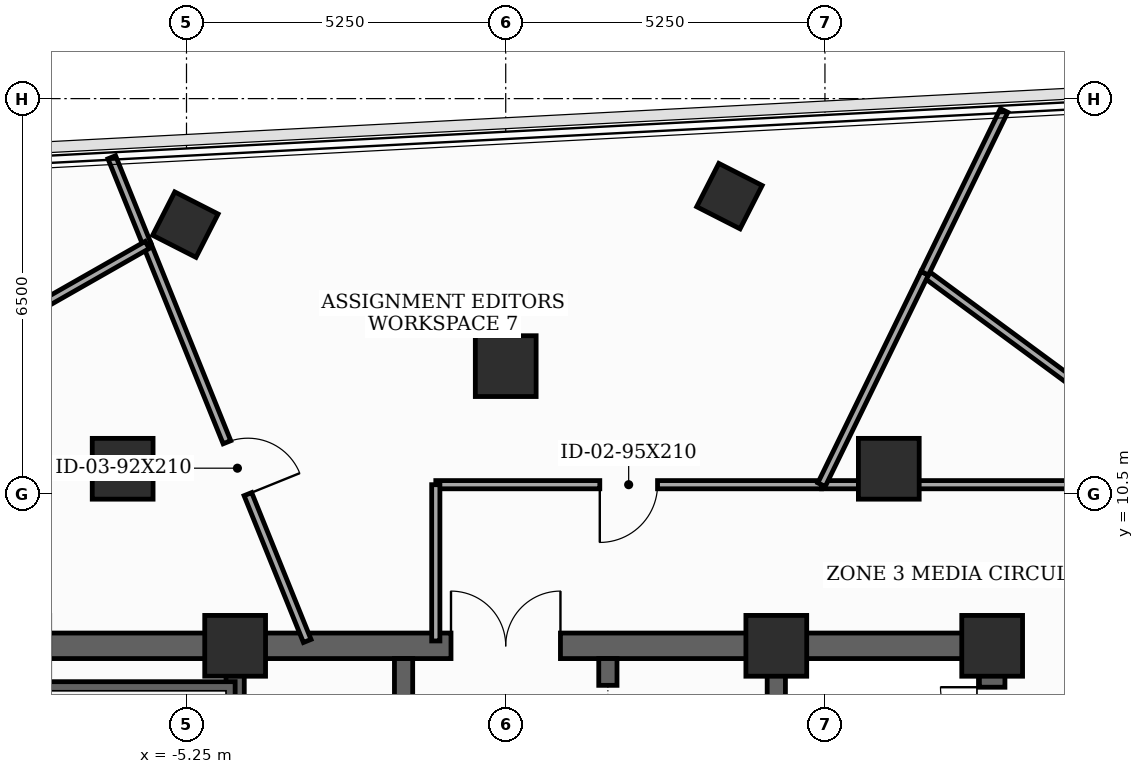
"""IFC4 building model, lengths in metres.
Left out: names, types, materials, properties, quantities, classifications, styles, units other than length and angle.
Written with IfcOpenShell. Run it as: python <this file> out.ifc"""

import sys

from ifc_helpers import new_model, si_unit, direction, frame, frame_2d, origin, origin_2d, place, context, subcontext, project, spatial, rectangle, extrude, element, fill, save


model = new_model("IFC4")
c1 = context("Model", 3, precision=1e-05, world=origin(), true_north=direction((0.0, 1.0)))
c2 = subcontext(c1, "Body", "Model", "MODEL_VIEW")
j1 = project(units=[si_unit("LENGTHUNIT", "METRE"), si_unit("PLANEANGLEUNIT", "RADIAN")], contexts=[c1])
p1 = place(None, origin())
s1 = spatial("IfcSite", under=j1, at=p1, CompositionType="ELEMENT")
p2 = place(p1, origin())
s2 = spatial("IfcBuilding", under=s1, at=p2, CompositionType="ELEMENT")
p3 = place(p2, frame((0.0, 0.0, 259.6)))
s3 = spatial("IfcBuildingStorey", under=s2, at=p3, CompositionType="ELEMENT", Elevation=259.6)
for number, where, z_axis, x_axis in (
    (1, (8.0, 8.0, 0.0), (0.0, 0.0, 1.0), (1.0, 0.0, 0.0)),
    (2, (4.45, 8.0, 0.0), (0.0, 0.0, 1.0), (1.0, 0.0, 0.0)),
    (3, (-4.45, 8.0, 0.0), (0.0, 0.0, 1.0), (1.0, 0.0, 0.0)),
    (4, (6.3, 10.912, 0.0), (0.0, 0.0, 1.0), (1.0, 0.0, 0.0)),
    (5, (0.0, 12.6, 0.0), (0.0, 0.0, 1.0), (1.0, 0.0, 0.0)),
    (6, (-6.3, 10.912, 0.0), (0.0, 0.0, 1.0), (1.0, 0.0, 0.0)),
):
    element("IfcColumn", number, at=place(p3, frame(where, z_axis=z_axis, x_axis=x_axis)), inside=s3, PredefinedType="COLUMN", context=c2, shape_type="SweptSolid", body=[
        extrude(rectangle(XDim=1.0, YDim=1.0, at=origin_2d()), origin(), (0.0, 0.0, 1.0), 3.7),
    ])
for number, where, z_axis, x_axis in (
    (7, (3.679, 15.396, 0.0), (0.0, 0.0, 1.0), (0.454, 0.891, 0.0)),
    (8, (-5.269, 14.927, 0.0), (0.0, 0.0, 1.0), (0.454, 0.891, 0.0)),
):
    element("IfcColumn", number, at=place(p3, frame(where, z_axis=z_axis, x_axis=x_axis)), inside=s3, PredefinedType="COLUMN", context=c2, shape_type="SweptSolid", body=[
        extrude(rectangle(XDim=0.8, YDim=0.8, at=origin_2d()), origin(), (0.0, 0.0, 1.0), 3.7),
    ])
p4 = place(p3, frame((8.0, -8.0, 0.0), z_axis=(0.0, 0.0, 1.0), x_axis=(0.0, 1.0, 0.0)))
e9 = element("IfcWall", 9, at=p4, inside=s3, PredefinedType="SHEAR", context=c2, shape_type="SweptSolid", body=[
    extrude(rectangle(XDim=16.0, YDim=0.42, at=frame_2d((8.0, 0.0))), origin(), (0.0, 0.0, 1.0), 3.5),
])
p5 = place(p4, frame((9.6, 0.0, 0.0)))
e10 = element("IfcOpeningElement", 10, at=p5, cuts=e9, PredefinedType="OPENING", context=c2, shape_type="SweptSolid", body=[
    extrude(rectangle(XDim=1.05, YDim=2.15, at=frame_2d((0.525, 1.075))), frame((0.0, 0.22, 0.0), z_axis=(0.0, -1.0, 0.0), x_axis=(1.0, 0.0, 0.0)), (0.0, 0.0, 1.0), 0.44),
])
p6 = place(p4, frame((14.469, 0.0, 0.0)))
e11 = element("IfcOpeningElement", 11, at=p6, cuts=e9, PredefinedType="OPENING", context=c2, shape_type="SweptSolid", body=[
    extrude(rectangle(XDim=0.85, YDim=2.02, at=frame_2d((0.425, 1.01))), frame((0.0, 0.22, 0.0), z_axis=(0.0, -1.0, 0.0), x_axis=(1.0, 0.0, 0.0)), (0.0, 0.0, 1.0), 0.44),
])
p7 = place(p3, frame((-8.0, 8.0, 0.0), z_axis=(0.0, 0.0, 1.0), x_axis=(1.0, 0.0, 0.0)))
e12 = element("IfcWall", 12, at=p7, inside=s3, PredefinedType="SHEAR", context=c2, shape_type="SweptSolid", body=[
    extrude(rectangle(XDim=16.0, YDim=0.42, at=frame_2d((8.0, 0.0))), origin(), (0.0, 0.0, 1.0), 3.5),
])
p8 = place(p7, frame((7.1, 0.0, 0.0)))
e13 = element("IfcOpeningElement", 13, at=p8, cuts=e12, PredefinedType="OPENING", context=c2, shape_type="SweptSolid", body=[
    extrude(rectangle(XDim=1.8, YDim=2.15, at=frame_2d((0.9, 1.075))), frame((0.0, 0.22, 0.0), z_axis=(0.0, -1.0, 0.0), x_axis=(1.0, 0.0, 0.0)), (0.0, 0.0, 1.0), 0.44),
])
for number, where, z_axis, x_axis in (
    (14, (-4.45, -7.79, 0.0), (0.0, 0.0, 1.0), (0.0, 1.0, 0.0)),
    (15, (4.45, -7.79, 0.0), (0.0, 0.0, 1.0), (0.0, 1.0, 0.0)),
):
    element("IfcWall", number, at=place(p3, frame(where, z_axis=z_axis, x_axis=x_axis)), inside=s3, PredefinedType="SHEAR", context=c2, shape_type="SweptSolid", body=[
        extrude(rectangle(XDim=15.58, YDim=0.3, at=frame_2d((7.79, 0.0))), origin(), (0.0, 0.0, 1.0), 3.5),
    ])
p9 = place(p3, frame((-7.79, 7.26, 0.0), z_axis=(0.0, 0.0, 1.0), x_axis=(1.0, 0.0, 0.0)))
e16 = element("IfcWall", 16, at=p9, inside=s3, PredefinedType="SHEAR", context=c2, shape_type="SweptSolid", body=[
    extrude(rectangle(XDim=3.34, YDim=0.3, at=frame_2d((1.67, 0.0))), origin(), (0.0, 0.0, 1.0), 3.5),
])
p10 = place(p3, frame((-1.68, -4.85, 0.0), z_axis=(0.0, 0.0, 1.0), x_axis=(0.0, 1.0, 0.0)))
e17 = element("IfcWall", 17, at=p10, inside=s3, PredefinedType="SHEAR", context=c2, shape_type="SweptSolid", body=[
    extrude(rectangle(XDim=12.64, YDim=0.3, at=frame_2d((6.32, 0.0))), origin(), (0.0, 0.0, 1.0), 3.5),
])
p11 = place(p10, frame((1.65, 0.0, 0.0)))
e18 = element("IfcOpeningElement", 18, at=p11, cuts=e17, PredefinedType="OPENING", context=c2, shape_type="SweptSolid", body=[
    extrude(rectangle(XDim=0.95, YDim=2.1, at=frame_2d((0.475, 1.05))), frame((0.0, 0.16, 0.0), z_axis=(0.0, -1.0, 0.0), x_axis=(1.0, 0.0, 0.0)), (0.0, 0.0, 1.0), 0.32),
])
p12 = place(p10, frame((5.9, 0.0, 0.0)))
e19 = element("IfcOpeningElement", 19, at=p12, cuts=e17, PredefinedType="OPENING", context=c2, shape_type="SweptSolid", body=[
    extrude(rectangle(XDim=0.95, YDim=2.1, at=frame_2d((0.475, 1.05))), frame((0.0, 0.16, 0.0), z_axis=(0.0, -1.0, 0.0), x_axis=(1.0, 0.0, 0.0)), (0.0, 0.0, 1.0), 0.32),
])
p13 = place(p10, frame((10.1, 0.0, 0.0)))
e20 = element("IfcOpeningElement", 20, at=p13, cuts=e17, PredefinedType="OPENING", context=c2, shape_type="SweptSolid", body=[
    extrude(rectangle(XDim=0.95, YDim=2.1, at=frame_2d((0.475, 1.05))), frame((0.0, 0.16, 0.0), z_axis=(0.0, -1.0, 0.0), x_axis=(1.0, 0.0, 0.0)), (0.0, 0.0, 1.0), 0.32),
])
p14 = place(p3, frame((1.68, -4.85, 0.0), z_axis=(0.0, 0.0, 1.0), x_axis=(0.0, 1.0, 0.0)))
e21 = element("IfcWall", 21, at=p14, inside=s3, PredefinedType="SHEAR", context=c2, shape_type="SweptSolid", body=[
    extrude(rectangle(XDim=12.64, YDim=0.3, at=frame_2d((6.32, 0.0))), origin(), (0.0, 0.0, 1.0), 3.5),
])
p15 = place(p14, frame((0.55, 0.0, 0.0)))
e22 = element("IfcOpeningElement", 22, at=p15, cuts=e21, PredefinedType="OPENING", context=c2, shape_type="SweptSolid", body=[
    extrude(rectangle(XDim=1.1, YDim=2.1, at=frame_2d((0.55, 1.05))), frame((0.0, 0.16, 0.0), z_axis=(0.0, -1.0, 0.0), x_axis=(1.0, 0.0, 0.0)), (0.0, 0.0, 1.0), 0.32),
])
p16 = place(p14, frame((2.65, 0.0, 0.0)))
e23 = element("IfcOpeningElement", 23, at=p16, cuts=e21, PredefinedType="OPENING", context=c2, shape_type="SweptSolid", body=[
    extrude(rectangle(XDim=1.1, YDim=2.1, at=frame_2d((0.55, 1.05))), frame((0.0, 0.16, 0.0), z_axis=(0.0, -1.0, 0.0), x_axis=(1.0, 0.0, 0.0)), (0.0, 0.0, 1.0), 0.32),
])
p17 = place(p14, frame((4.75, 0.0, 0.0)))
e24 = element("IfcOpeningElement", 24, at=p17, cuts=e21, PredefinedType="OPENING", context=c2, shape_type="SweptSolid", body=[
    extrude(rectangle(XDim=1.1, YDim=2.1, at=frame_2d((0.55, 1.05))), frame((0.0, 0.16, 0.0), z_axis=(0.0, -1.0, 0.0), x_axis=(1.0, 0.0, 0.0)), (0.0, 0.0, 1.0), 0.32),
])
p18 = place(p14, frame((8.2, 0.0, 0.0)))
e25 = element("IfcOpeningElement", 25, at=p18, cuts=e21, PredefinedType="OPENING", context=c2, shape_type="SweptSolid", body=[
    extrude(rectangle(XDim=0.95, YDim=2.1, at=frame_2d((0.475, 1.05))), frame((0.0, 0.16, 0.0), z_axis=(0.0, -1.0, 0.0), x_axis=(1.0, 0.0, 0.0)), (0.0, 0.0, 1.0), 0.32),
])
p19 = place(p14, frame((11.25, 0.0, 0.0)))
e26 = element("IfcOpeningElement", 26, at=p19, cuts=e21, PredefinedType="OPENING", context=c2, shape_type="SweptSolid", body=[
    extrude(rectangle(XDim=0.95, YDim=2.1, at=frame_2d((0.475, 1.05))), frame((0.0, 0.16, 0.0), z_axis=(0.0, -1.0, 0.0), x_axis=(1.0, 0.0, 0.0)), (0.0, 0.0, 1.0), 0.32),
])
p20 = place(p3, frame((10.15, 10.65, 0.0), z_axis=(0.0, 0.0, 1.0), x_axis=(-1.0, 0.0, 0.0)))
e27 = element("IfcWall", 27, at=p20, inside=s3, PredefinedType="PARTITIONING", context=c2, shape_type="SweptSolid", body=[
    extrude(rectangle(XDim=4.956, YDim=0.135, at=frame_2d((2.478, 0.0))), origin(), (0.0, 0.0, 1.0), 2.885),
])
p21 = place(p3, frame((5.194, 10.65, 0.0), z_axis=(0.0, 0.0, 1.0), x_axis=(-1.0, 0.0, 0.0)))
e28 = element("IfcWall", 28, at=p21, inside=s3, PredefinedType="PARTITIONING", context=c2, shape_type="SweptSolid", body=[
    extrude(rectangle(XDim=6.344, YDim=0.135, at=frame_2d((3.172, 0.0))), origin(), (0.0, 0.0, 1.0), 2.885),
])
p22 = place(p21, frame((2.697, 0.0, 0.0)))
e29 = element("IfcOpeningElement", 29, at=p22, cuts=e28, PredefinedType="OPENING", context=c2, shape_type="SweptSolid", body=[
    extrude(rectangle(XDim=0.95, YDim=2.1, at=frame_2d((0.475, 1.05))), frame((0.0, 0.077, 0.0), z_axis=(0.0, -1.0, 0.0), x_axis=(1.0, 0.0, 0.0)), (0.0, 0.0, 1.0), 0.155),
])
p23 = place(p3, frame((-1.15, 10.65, 0.0), z_axis=(0.0, 0.0, 1.0), x_axis=(0.0, -1.0, 0.0)))
e30 = element("IfcWall", 30, at=p23, inside=s3, PredefinedType="PARTITIONING", context=c2, shape_type="SweptSolid", body=[
    extrude(rectangle(XDim=2.57, YDim=0.135, at=frame_2d((1.285, 0.0))), origin(), (0.0, 0.0, 1.0), 2.885),
])
p24 = place(p3, frame((11.788, 10.521, 0.0), z_axis=(0.0, 0.0, 1.0), x_axis=(-0.805162772786, 0.593053883993, 0.0)))
e31 = element("IfcWall", 31, at=p24, inside=s3, PredefinedType="PARTITIONING", context=c2, shape_type="SweptSolid", body=[
    extrude(rectangle(XDim=6.082, YDim=0.135, at=frame_2d((3.041, 0.0))), origin(), (0.0, 0.0, 1.0), 3.035),
])
p25 = place(p3, frame((6.891, 14.128, 0.0), z_axis=(0.0, 0.0, 1.0), x_axis=(-0.438511877771, -0.898725393573, 0.0)))
e32 = element("IfcWall", 32, at=p25, inside=s3, PredefinedType="PARTITIONING", context=c2, shape_type="SweptSolid", body=[
    extrude(rectangle(XDim=3.87, YDim=0.135, at=frame_2d((1.935, 0.0))), origin(), (0.0, 0.0, 1.0), 2.885),
])
p26 = place(p3, frame((8.196, 16.805, 0.0), z_axis=(0.0, 0.0, 1.0), x_axis=(-0.438139314435, -0.898907081486, 0.0)))
e33 = element("IfcWall", 33, at=p26, inside=s3, PredefinedType="PARTITIONING", context=c2, shape_type="SweptSolid", body=[
    extrude(rectangle(XDim=2.978, YDim=0.135, at=frame_2d((1.489, 0.0))), origin(), (0.0, 0.0, 1.0), 3.035),
])
p27 = place(p3, frame((-5.896, 14.593, 0.0), z_axis=(0.0, 0.0, 1.0), x_axis=(0.374630268076, -0.927174289032, 0.0)))
e34 = element("IfcWall", 34, at=p27, inside=s3, PredefinedType="PARTITIONING", context=c2, shape_type="SweptSolid", body=[
    extrude(rectangle(XDim=7.024, YDim=0.135, at=frame_2d((3.512, 0.0))), origin(), (0.0, 0.0, 1.0), 2.885),
])
p28 = place(p27, frame((3.5, 0.0, 0.0)))
e35 = element("IfcOpeningElement", 35, at=p28, cuts=e34, PredefinedType="OPENING", context=c2, shape_type="SweptSolid", body=[
    extrude(rectangle(XDim=0.92, YDim=2.1, at=frame_2d((0.46, 1.05))), frame((0.0, 0.077, 0.0), z_axis=(0.0, -1.0, 0.0), x_axis=(1.0, 0.0, 0.0)), (0.0, 0.0, 1.0), 0.155),
])
p29 = place(p3, frame((-6.479, 16.035, 0.0), z_axis=(0.0, 0.0, 1.0), x_axis=(0.374743256905, -0.927128627217, 0.0)))
e36 = element("IfcWall", 36, at=p29, inside=s3, PredefinedType="PARTITIONING", context=c2, shape_type="SweptSolid", body=[
    extrude(rectangle(XDim=1.556, YDim=0.135, at=frame_2d((0.778, 0.0))), origin(), (0.0, 0.0, 1.0), 3.035),
])
p30 = place(p3, frame((-5.896, 14.593, 0.0), z_axis=(0.0, 0.0, 1.0), x_axis=(-0.868954887981, -0.494891303877, 0.0)))
e37 = element("IfcWall", 37, at=p30, inside=s3, PredefinedType="PARTITIONING", context=c2, shape_type="SweptSolid", body=[
    extrude(rectangle(XDim=4.617, YDim=0.135, at=frame_2d((2.309, 0.0))), origin(), (0.0, 0.0, 1.0), 3.035),
])
p31 = place(p6, origin())
e38 = element("IfcDoor", 38, at=p31, inside=s3, OperationType="SINGLE_SWING_RIGHT", PredefinedType="TRAPDOOR", context=c2, shape_type="SweptSolid", body=[
    extrude(rectangle(XDim=0.85, YDim=2.02, at=frame_2d((0.425, 1.01))), frame((0.0, 0.025, 0.0), z_axis=(0.0, -1.0, 0.0), x_axis=(1.0, 0.0, 0.0)), (0.0, 0.0, 1.0), 0.05),
])
fill(e11, e38)
p32 = place(p8, origin())
e39 = element("IfcDoor", 39, at=p32, inside=s3, OperationType="DOUBLE_DOOR_SINGLE_SWING", PredefinedType="DOOR", context=c2, shape_type="SweptSolid", body=[
    extrude(rectangle(XDim=1.8, YDim=2.15, at=frame_2d((0.9, 1.075))), frame((0.0, 0.025, 0.0), z_axis=(0.0, -1.0, 0.0), x_axis=(1.0, 0.0, 0.0)), (0.0, 0.0, 1.0), 0.05),
])
fill(e13, e39)
p33 = place(p19, origin())
e40 = element("IfcDoor", 40, at=p33, inside=s3, OperationType="SLIDING_TO_LEFT", PredefinedType="DOOR", context=c2, shape_type="SweptSolid", body=[
    extrude(rectangle(XDim=0.95, YDim=2.1, at=frame_2d((0.475, 1.05))), frame((0.0, 0.025, 0.0), z_axis=(0.0, -1.0, 0.0), x_axis=(1.0, 0.0, 0.0)), (0.0, 0.0, 1.0), 0.05),
])
fill(e26, e40)
p34 = place(p22, origin())
e41 = element("IfcDoor", 41, at=p34, inside=s3, OperationType="SINGLE_SWING_RIGHT", PredefinedType="DOOR", context=c2, shape_type="SweptSolid", body=[
    extrude(rectangle(XDim=0.95, YDim=2.1, at=frame_2d((0.475, 1.05))), frame((0.0, 0.025, 0.0), z_axis=(0.0, -1.0, 0.0), x_axis=(1.0, 0.0, 0.0)), (0.0, 0.0, 1.0), 0.05),
])
fill(e29, e41)
p35 = place(p28, origin())
e42 = element("IfcDoor", 42, at=p35, inside=s3, OperationType="SINGLE_SWING_RIGHT", PredefinedType="DOOR", context=c2, shape_type="SweptSolid", body=[
    extrude(rectangle(XDim=0.92, YDim=2.1, at=frame_2d((0.46, 1.05))), frame((0.0, 0.025, 0.0), z_axis=(0.0, -1.0, 0.0), x_axis=(1.0, 0.0, 0.0)), (0.0, 0.0, 1.0), 0.05),
])
fill(e35, e42)
save(model, sys.argv[1])
